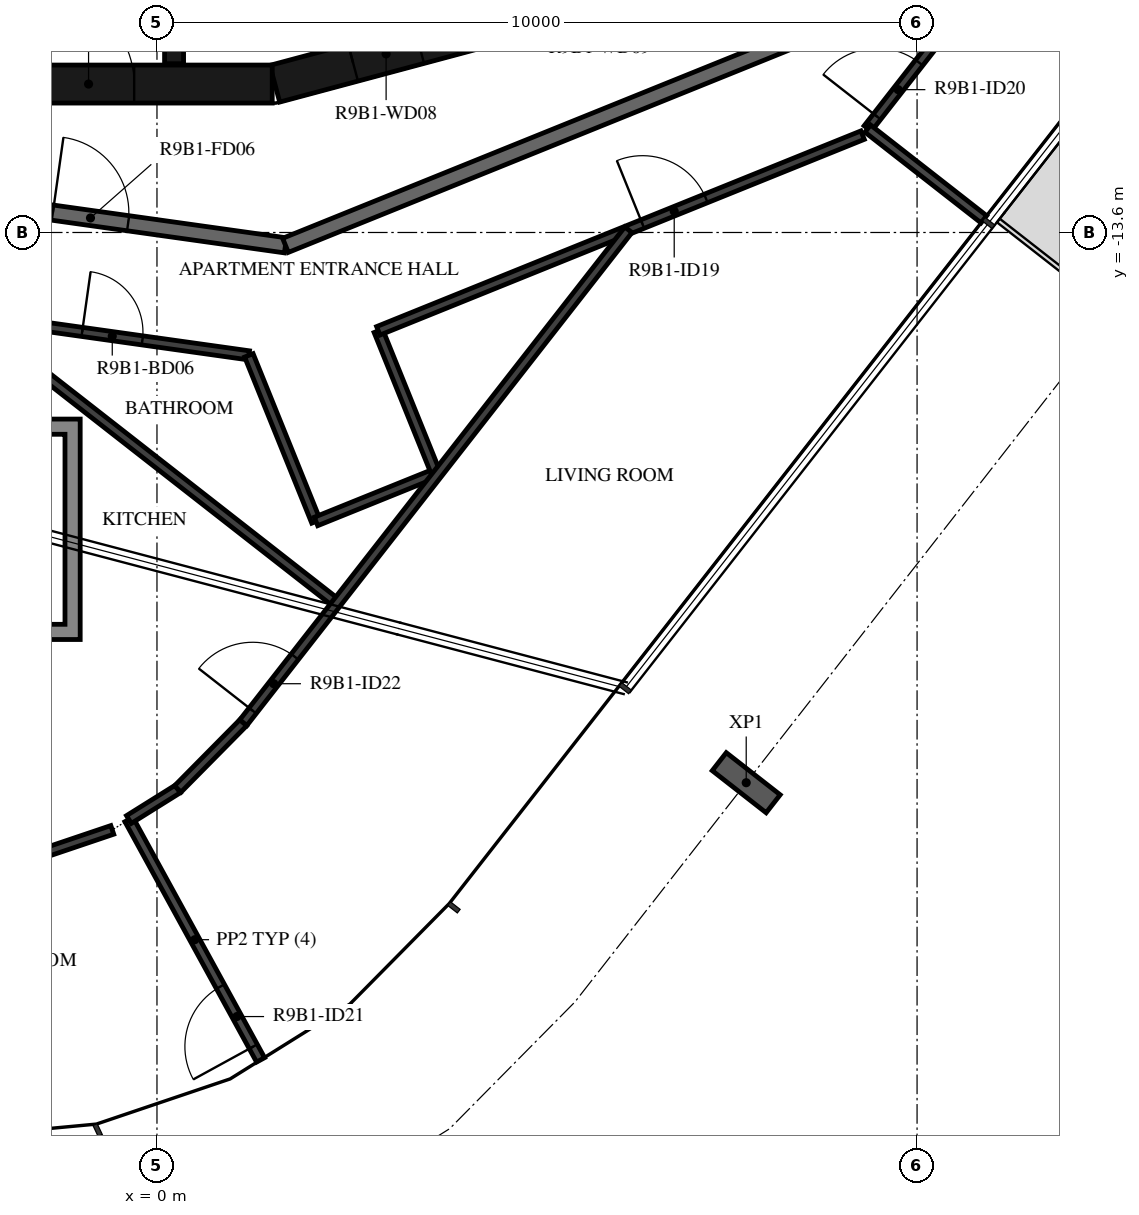
"""IFC4 building model, lengths in metres.
Left out: names, types, materials, properties, quantities, classifications, styles, units other than length and angle.
Written with IfcOpenShell. Run it as: python <this file> out.ifc"""

import sys

from ifc_helpers import new_model, si_unit, direction, frame, frame_2d, origin, origin_2d, place, context, subcontext, project, spatial, polyline, rectangle, i_section, outline, extrude, element, fill, save


model = new_model("IFC4")
c1 = context("Model", 3, precision=1e-05, world=origin(), true_north=direction((0.0, 1.0)))
c2 = subcontext(c1, "Body", "Model", "MODEL_VIEW")
j1 = project(units=[si_unit("LENGTHUNIT", "METRE"), si_unit("PLANEANGLEUNIT", "RADIAN")], contexts=[c1])
p1 = place(None, origin())
s1 = spatial("IfcSite", under=j1, at=p1, CompositionType="ELEMENT")
p2 = place(p1, origin())
s2 = spatial("IfcBuilding", under=s1, at=p2, CompositionType="ELEMENT")
p3 = place(p2, frame((0.0, 0.0, 350.5)))
s3 = spatial("IfcBuildingStorey", under=s2, at=p3, CompositionType="ELEMENT", Elevation=350.5)
p4 = place(p3, frame((7.752, -20.839, -0.38), z_axis=(0.0, 0.0, 1.0), x_axis=(-0.615661060634, -0.788011077599, 0.0)))
e1 = element("IfcColumn", 1, at=p4, inside=s3, PredefinedType="COLUMN", context=c2, shape_type="SweptSolid", body=[
    extrude(i_section(OverallWidth=0.3, OverallDepth=0.9, WebThickness=0.019, FlangeThickness=0.035, FilletRadius=0.03, at=origin_2d()), origin(), (0.0, 0.0, 1.0), 3.5),
])
p5 = place(p3, frame((1.55, -11.643, 0.0), z_axis=(0.0, 0.0, 1.0), x_axis=(0.965948410781, 0.258734743916, 0.0)))
e2 = element("IfcWall", 2, at=p5, inside=s3, PredefinedType="SHEAR", context=c2, shape_type="SweptSolid", body=[
    extrude(rectangle(XDim=3.033, YDim=0.5, at=frame_2d((1.516, 0.0))), origin(), (0.0, 0.0, 1.0), 3.12),
])
p6 = place(p5, frame((1.066, 0.0, 0.0)))
e3 = element("IfcOpeningElement", 3, at=p6, cuts=e2, PredefinedType="OPENING", context=c2, shape_type="SweptSolid", body=[
    extrude(rectangle(XDim=0.9, YDim=2.1, at=frame_2d((0.45, 1.05))), frame((0.0, 0.26, 0.0), z_axis=(0.0, -1.0, 0.0), x_axis=(1.0, 0.0, 0.0)), (0.0, 0.0, 1.0), 0.52),
])
p7 = place(p3, frame((-1.516, -11.647, 0.0), z_axis=(0.0, 0.0, 1.0), x_axis=(1.0, 0.0, 0.0)))
e4 = element("IfcWall", 4, at=p7, inside=s3, PredefinedType="SHEAR", context=c2, shape_type="SweptSolid", body=[
    extrude(rectangle(XDim=3.033, YDim=0.5, at=frame_2d((1.516, 0.0))), origin(), (0.0, 0.0, 1.0), 3.12),
])
p8 = place(p7, frame((0.016, 0.0, 0.0)))
e5 = element("IfcOpeningElement", 5, at=p8, cuts=e4, PredefinedType="OPENING", context=c2, shape_type="SweptSolid", body=[
    extrude(rectangle(XDim=1.2, YDim=2.1, at=frame_2d((0.6, 1.05))), frame((0.0, 0.26, 0.0), z_axis=(0.0, -1.0, 0.0), x_axis=(1.0, 0.0, 0.0)), (0.0, 0.0, 1.0), 0.52),
])
p9 = place(p3, frame((0.225, -8.97, 0.0), z_axis=(0.0, 0.0, 1.0), x_axis=(0.0, -1.0, 0.0)))
e6 = element("IfcWall", 6, at=p9, inside=s3, PredefinedType="SHEAR", context=c2, shape_type="SweptSolid", body=[
    extrude(rectangle(XDim=2.41, YDim=0.25, at=frame_2d((1.205, 0.0))), origin(), (0.0, 0.0, 1.0), 3.12),
])
p10 = place(p3, frame((-5.42, -12.77, 0.0), z_axis=(0.0, 0.0, 1.0), x_axis=(0.990270565508, -0.139155334385, 0.0)))
e7 = element("IfcWall", 7, at=p10, inside=s3, PredefinedType="STANDARD", context=c2, shape_type="SweptSolid", body=[
    extrude(rectangle(XDim=7.181, YDim=0.2, at=frame_2d((3.59, 0.0))), origin(), (0.0, 0.0, 1.0), 3.12),
])
p11 = place(p10, frame((2.39, 0.0, 0.0)))
e8 = element("IfcOpeningElement", 8, at=p11, cuts=e7, PredefinedType="OPENING", context=c2, shape_type="SweptSolid", body=[
    extrude(rectangle(XDim=1.0, YDim=2.1, at=frame_2d((0.5, 1.05))), frame((0.0, 0.11, 0.0), z_axis=(0.0, -1.0, 0.0), x_axis=(1.0, 0.0, 0.0)), (0.0, 0.0, 1.0), 0.22),
])
p12 = place(p10, frame((4.091, 0.0, 0.0)))
e9 = element("IfcOpeningElement", 9, at=p12, cuts=e7, PredefinedType="OPENING", context=c2, shape_type="SweptSolid", body=[
    extrude(rectangle(XDim=1.0, YDim=2.1, at=frame_2d((0.5, 1.05))), frame((0.0, 0.11, 0.0), z_axis=(0.0, -1.0, 0.0), x_axis=(1.0, 0.0, 0.0)), (0.0, 0.0, 1.0), 0.22),
])
p13 = place(p3, frame((1.691, -13.769, 0.0), z_axis=(0.0, 0.0, 1.0), x_axis=(0.92717916932, 0.374618189599, 0.0)))
e10 = element("IfcWall", 10, at=p13, inside=s3, PredefinedType="STANDARD", context=c2, shape_type="SweptSolid", body=[
    extrude(rectangle(XDim=7.181, YDim=0.2, at=frame_2d((3.591, 0.0))), origin(), (0.0, 0.0, 1.0), 3.12),
])
p14 = place(p3, frame((-6.027, -14.199, 0.0), z_axis=(0.0, 0.0, 1.0), x_axis=(0.990271617837, -0.139147845494, 0.0)))
e11 = element("IfcWall", 11, at=p14, inside=s3, PredefinedType="PARTITIONING", context=c2, shape_type="SweptSolid", body=[
    extrude(rectangle(XDim=7.308, YDim=0.12, at=frame_2d((3.654, 0.0))), origin(), (0.0, 0.0, 1.0), 3.12),
])
p15 = place(p14, frame((5.093, 0.0, 0.0)))
e12 = element("IfcOpeningElement", 12, at=p15, cuts=e11, PredefinedType="OPENING", context=c2, shape_type="SweptSolid", body=[
    extrude(rectangle(XDim=0.8, YDim=2.1, at=frame_2d((0.4, 1.05))), frame((0.0, 0.07, 0.0), z_axis=(0.0, -1.0, 0.0), x_axis=(1.0, 0.0, 0.0)), (0.0, 0.0, 1.0), 0.14),
])
p16 = place(p3, frame((1.209, -15.216, 0.0), z_axis=(0.0, 0.0, 1.0), x_axis=(0.374531550488, -0.927214170345, 0.0)))
e13 = element("IfcWall", 13, at=p16, inside=s3, PredefinedType="PARTITIONING", context=c2, shape_type="SweptSolid", body=[
    extrude(rectangle(XDim=2.357, YDim=0.12, at=frame_2d((1.179, 0.0))), origin(), (0.0, 0.0, 1.0), 3.12),
])
p17 = place(p3, frame((2.092, -17.402, 0.0), z_axis=(0.0, 0.0, 1.0), x_axis=(0.927153589835, 0.374681492546, 0.0)))
e14 = element("IfcWall", 14, at=p17, inside=s3, PredefinedType="PARTITIONING", context=c2, shape_type="SweptSolid", body=[
    extrude(rectangle(XDim=1.7, YDim=0.12, at=frame_2d((0.85, 0.0))), origin(), (0.0, 0.0, 1.0), 3.12),
])
p18 = place(p3, frame((3.668, -16.765, 0.0), z_axis=(0.0, 0.0, 1.0), x_axis=(-0.374621045498, 0.927178015416, 0.0)))
e15 = element("IfcWall", 15, at=p18, inside=s3, PredefinedType="PARTITIONING", context=c2, shape_type="SweptSolid", body=[
    extrude(rectangle(XDim=2.018, YDim=0.12, at=frame_2d((1.009, 0.0))), origin(), (0.0, 0.0, 1.0), 3.12),
])
p19 = place(p3, frame((2.912, -14.894, 0.0), z_axis=(0.0, 0.0, 1.0), x_axis=(0.927182280165, 0.374610490174, 0.0)))
e16 = element("IfcWall", 16, at=p19, inside=s3, PredefinedType="PARTITIONING", context=c2, shape_type="SweptSolid", body=[
    extrude(rectangle(XDim=6.872, YDim=0.12, at=frame_2d((3.436, 0.0))), origin(), (0.0, 0.0, 1.0), 3.12),
])
p20 = place(p19, frame((3.748, 0.0, 0.0)))
e17 = element("IfcOpeningElement", 17, at=p20, cuts=e16, PredefinedType="OPENING", context=c2, shape_type="SweptSolid", body=[
    extrude(rectangle(XDim=0.9, YDim=2.1, at=frame_2d((0.45, 1.05))), frame((0.0, 0.07, 0.0), z_axis=(0.0, -1.0, 0.0), x_axis=(1.0, 0.0, 0.0)), (0.0, 0.0, 1.0), 0.14),
])
p21 = place(p3, frame((9.351, -12.233, 0.0), z_axis=(0.0, 0.0, 1.0), x_axis=(0.615678207218, 0.787997680933, 0.0)))
e18 = element("IfcWall", 18, at=p21, inside=s3, PredefinedType="PARTITIONING", context=c2, shape_type="SweptSolid", body=[
    extrude(rectangle(XDim=7.765, YDim=0.12, at=frame_2d((3.883, 0.0))), origin(), (0.0, 0.0, 1.0), 3.12),
])
p22 = place(p21, frame((0.2, 0.0, 0.0)))
e19 = element("IfcOpeningElement", 19, at=p22, cuts=e18, PredefinedType="OPENING", context=c2, shape_type="SweptSolid", body=[
    extrude(rectangle(XDim=0.9, YDim=2.1, at=frame_2d((0.45, 1.05))), frame((0.0, 0.07, 0.0), z_axis=(0.0, -1.0, 0.0), x_axis=(1.0, 0.0, 0.0)), (0.0, 0.0, 1.0), 0.14),
])
p23 = place(p3, frame((-0.588, -21.459, 0.0), z_axis=(0.0, 0.0, 1.0), x_axis=(-0.94737753159, -0.320118435332, 0.0)))
e20 = element("IfcWall", 20, at=p23, inside=s3, PredefinedType="PARTITIONING", context=c2, shape_type="SweptSolid", body=[
    extrude(rectangle(XDim=1.016, YDim=0.12, at=frame_2d((0.508, 0.0))), origin(), (0.0, 0.0, 1.0), 3.12),
])
p24 = place(p3, frame((1.363, -24.485, 0.0), z_axis=(0.0, 0.0, 1.0), x_axis=(-0.480374148719, 0.877063667725, 0.0)))
e21 = element("IfcWall", 21, at=p24, inside=s3, PredefinedType="PARTITIONING", context=c2, shape_type="SweptSolid", body=[
    extrude(rectangle(XDim=3.606, YDim=0.12, at=frame_2d((1.803, 0.0))), origin(), (0.0, 0.0, 1.0), 2.73),
])
p25 = place(p24, frame((0.2, 0.0, 0.0)))
e22 = element("IfcOpeningElement", 22, at=p25, cuts=e21, PredefinedType="OPENING", context=c2, shape_type="SweptSolid", body=[
    extrude(rectangle(XDim=0.9, YDim=2.1, at=frame_2d((0.45, 1.05))), frame((0.0, 0.07, 0.0), z_axis=(0.0, -1.0, 0.0), x_axis=(1.0, 0.0, 0.0)), (0.0, 0.0, 1.0), 0.14),
])
p26 = place(p3, frame((2.363, -18.478, 0.0), z_axis=(0.0, 0.0, 1.0), x_axis=(-0.788010669333, 0.615661583191, 0.0)))
e23 = element("IfcWall", 23, at=p26, inside=s3, PredefinedType="PARTITIONING", context=c2, shape_type="SweptSolid", body=[
    extrude(rectangle(XDim=5.672, YDim=0.12, at=frame_2d((2.836, 0.0))), origin(), (0.0, 0.0, 1.0), 3.12),
])
p27 = place(p3, frame((-0.369, -21.323, 0.0), z_axis=(0.0, 0.0, 1.0), x_axis=(0.847998304005, 0.529998940003, 0.0)))
e24 = element("IfcWall", 24, at=p27, inside=s3, PredefinedType="PARTITIONING", context=c2, shape_type="SweptSolid", body=[
    extrude(rectangle(XDim=0.758, YDim=0.12, at=frame_2d((0.379, 0.0))), origin(), (0.0, 0.0, 1.0), 3.12),
])
p28 = place(p3, frame((0.274, -20.921, 0.0), z_axis=(0.0, 0.0, 1.0), x_axis=(0.702915150142, 0.711273710818, 0.0)))
e25 = element("IfcWall", 25, at=p28, inside=s3, PredefinedType="PARTITIONING", context=c2, shape_type="SweptSolid", body=[
    extrude(rectangle(XDim=1.227, YDim=0.12, at=frame_2d((0.613, 0.0))), origin(), (0.0, 0.0, 1.0), 3.12),
])
p29 = place(p3, frame((1.136, -20.049, 0.0), z_axis=(0.0, 0.0, 1.0), x_axis=(0.615662465763, 0.788009979792, 0.0)))
e26 = element("IfcWall", 26, at=p29, inside=s3, PredefinedType="PARTITIONING", context=c2, shape_type="SweptSolid", body=[
    extrude(rectangle(XDim=8.229, YDim=0.12, at=frame_2d((4.114, 0.0))), origin(), (0.0, 0.0, 1.0), 3.12),
])
p30 = place(p29, frame((0.2, 0.0, 0.0)))
e27 = element("IfcOpeningElement", 27, at=p30, cuts=e26, PredefinedType="OPENING", context=c2, shape_type="SweptSolid", body=[
    extrude(rectangle(XDim=0.9, YDim=2.1, at=frame_2d((0.45, 1.05))), frame((0.0, 0.07, 0.0), z_axis=(0.0, -1.0, 0.0), x_axis=(1.0, 0.0, 0.0)), (0.0, 0.0, 1.0), 0.14),
])
p31 = place(p3, frame((10.878, -13.427, 0.0), z_axis=(0.0, 0.0, 1.0), x_axis=(-0.787980458379, 0.615700249483, 0.0)))
e28 = element("IfcWall", 28, at=p31, inside=s3, PredefinedType="PARTITIONING", context=c2, shape_type="SweptSolid", body=[
    extrude(rectangle(XDim=1.939, YDim=0.12, at=frame_2d((0.969, 0.0))), origin(), (0.0, 0.0, 1.0), 2.73),
])
p32 = place(p3, origin())
e29 = element("IfcWall", 29, at=p32, inside=s3, PredefinedType="STANDARD", context=c2, shape_type="SweptSolid", body=[
    extrude(outline(polyline([(-1.01, -16.055), (-1.01, -18.955), (-3.91, -18.955), (-3.91, -16.055), (-1.01, -16.055)]), holes=[polyline([(-3.71, -18.755), (-1.21, -18.755), (-1.21, -16.255), (-3.71, -16.255), (-3.71, -18.755)])]), origin(), (0.0, 0.0, 1.0), 3.12),
])
p33 = place(p8, origin())
e30 = element("IfcDoor", 30, at=p33, inside=s3, OperationType="SINGLE_SWING_RIGHT", PredefinedType="DOOR", context=c2, shape_type="SweptSolid", body=[
    extrude(rectangle(XDim=1.2, YDim=2.1, at=frame_2d((0.6, 1.05))), frame((0.0, 0.025, 0.0), z_axis=(0.0, -1.0, 0.0), x_axis=(1.0, 0.0, 0.0)), (0.0, 0.0, 1.0), 0.05),
])
fill(e5, e30)
p34 = place(p6, origin())
e31 = element("IfcDoor", 31, at=p34, inside=s3, OperationType="SINGLE_SWING_RIGHT", PredefinedType="DOOR", context=c2, shape_type="SweptSolid", body=[
    extrude(rectangle(XDim=0.9, YDim=2.1, at=frame_2d((0.45, 1.05))), frame((0.0, 0.025, 0.0), z_axis=(0.0, -1.0, 0.0), x_axis=(1.0, 0.0, 0.0)), (0.0, 0.0, 1.0), 0.05),
])
fill(e3, e31)
p35 = place(p12, origin())
e32 = element("IfcDoor", 32, at=p35, inside=s3, OperationType="SINGLE_SWING_RIGHT", PredefinedType="DOOR", context=c2, shape_type="SweptSolid", body=[
    extrude(rectangle(XDim=1.0, YDim=2.1, at=frame_2d((0.5, 1.05))), frame((0.0, 0.025, 0.0), z_axis=(0.0, -1.0, 0.0), x_axis=(1.0, 0.0, 0.0)), (0.0, 0.0, 1.0), 0.05),
])
fill(e9, e32)
p36 = place(p15, origin())
e33 = element("IfcDoor", 33, at=p36, inside=s3, OperationType="SINGLE_SWING_LEFT", PredefinedType="DOOR", context=c2, shape_type="SweptSolid", body=[
    extrude(rectangle(XDim=0.8, YDim=2.1, at=frame_2d((0.4, 1.05))), frame((0.0, 0.025, 0.0), z_axis=(0.0, -1.0, 0.0), x_axis=(1.0, 0.0, 0.0)), (0.0, 0.0, 1.0), 0.05),
])
fill(e12, e33)
p37 = place(p20, origin())
e34 = element("IfcDoor", 34, at=p37, inside=s3, OperationType="SINGLE_SWING_LEFT", PredefinedType="DOOR", context=c2, shape_type="SweptSolid", body=[
    extrude(rectangle(XDim=0.9, YDim=2.1, at=frame_2d((0.45, 1.05))), frame((0.0, 0.025, 0.0), z_axis=(0.0, -1.0, 0.0), x_axis=(1.0, 0.0, 0.0)), (0.0, 0.0, 1.0), 0.05),
])
fill(e17, e34)
p38 = place(p22, origin())
e35 = element("IfcDoor", 35, at=p38, inside=s3, OperationType="SINGLE_SWING_LEFT", PredefinedType="DOOR", context=c2, shape_type="SweptSolid", body=[
    extrude(rectangle(XDim=0.9, YDim=2.1, at=frame_2d((0.45, 1.05))), frame((0.0, 0.025, 0.0), z_axis=(0.0, -1.0, 0.0), x_axis=(1.0, 0.0, 0.0)), (0.0, 0.0, 1.0), 0.05),
])
fill(e19, e35)
p39 = place(p25, origin())
e36 = element("IfcDoor", 36, at=p39, inside=s3, OperationType="SINGLE_SWING_LEFT", PredefinedType="DOOR", context=c2, shape_type="SweptSolid", body=[
    extrude(rectangle(XDim=0.9, YDim=2.1, at=frame_2d((0.45, 1.05))), frame((0.0, 0.025, 0.0), z_axis=(0.0, -1.0, 0.0), x_axis=(1.0, 0.0, 0.0)), (0.0, 0.0, 1.0), 0.05),
])
fill(e22, e36)
p40 = place(p30, origin())
e37 = element("IfcDoor", 37, at=p40, inside=s3, OperationType="SINGLE_SWING_RIGHT", PredefinedType="DOOR", context=c2, shape_type="SweptSolid", body=[
    extrude(rectangle(XDim=0.9, YDim=2.1, at=frame_2d((0.45, 1.05))), frame((0.0, 0.025, 0.0), z_axis=(0.0, -1.0, 0.0), x_axis=(1.0, 0.0, 0.0)), (0.0, 0.0, 1.0), 0.05),
])
fill(e27, e37)
save(model, sys.argv[1])
